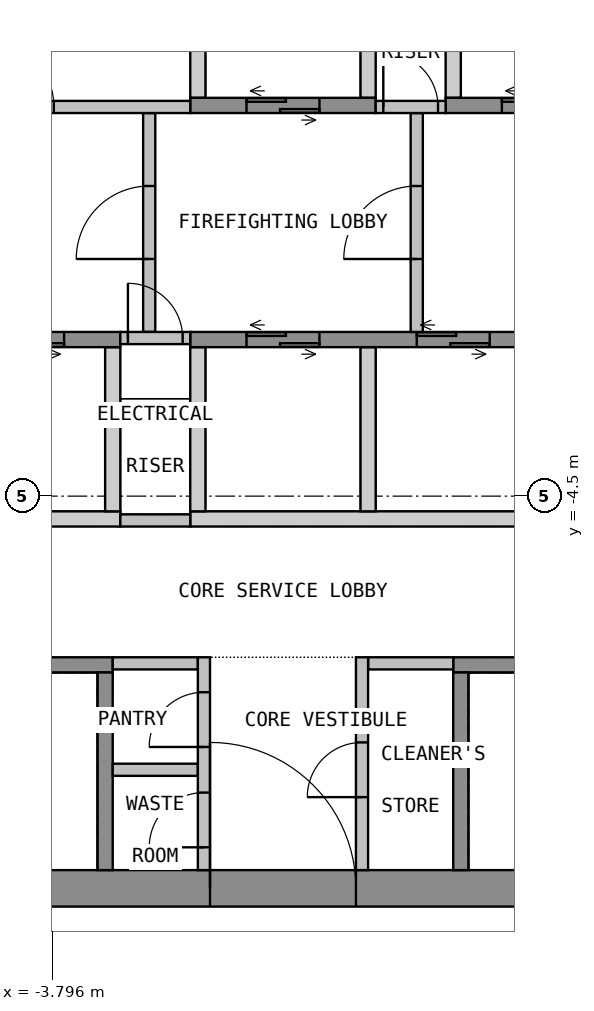
"""IFC4 building model, lengths in metres.
Left out: names, types, materials, properties, quantities, classifications, styles, units other than length and angle.
Written with IfcOpenShell. Run it as: python <this file> out.ifc"""

import sys

from ifc_helpers import new_model, si_unit, direction, frame, frame_2d, origin, place, context, subcontext, project, spatial, polyline, rectangle, outline, extrude, element, fill, save


model = new_model("IFC4")
c1 = context("Model", 3, precision=1e-05, world=origin(), true_north=direction((0.0, 1.0)))
c2 = subcontext(c1, "Body", "Model", "MODEL_VIEW")
j1 = project(units=[si_unit("LENGTHUNIT", "METRE"), si_unit("PLANEANGLEUNIT", "RADIAN")], contexts=[c1])
p1 = place(None, origin())
s1 = spatial("IfcSite", under=j1, at=p1, CompositionType="ELEMENT")
p2 = place(p1, origin())
s2 = spatial("IfcBuilding", under=s1, at=p2, CompositionType="ELEMENT")
p3 = place(p2, frame((0.0, 0.0, 286.5)))
s3 = spatial("IfcBuildingStorey", under=s2, at=p3, CompositionType="ELEMENT", Elevation=286.5)
p4 = place(p3, frame((-13.5, -10.95, 0.0), z_axis=(0.0, 0.0, 1.0), x_axis=(1.0, 0.0, 0.0)))
e1 = element("IfcWall", 1, at=p4, inside=s3, PredefinedType="SHEAR", context=c2, shape_type="SweptSolid", body=[
    extrude(rectangle(XDim=27.0, YDim=0.6, at=frame_2d((13.5, 0.0))), origin(), (0.0, 0.0, 1.0), 3.575),
])
p5 = place(p4, frame((12.3, 0.0, 0.0)))
e2 = element("IfcOpeningElement", 2, at=p5, cuts=e1, PredefinedType="OPENING", context=c2, shape_type="SweptSolid", body=[
    extrude(rectangle(XDim=2.4, YDim=2.1, at=frame_2d((1.2, 1.05))), frame((0.0, 0.31, 0.0), z_axis=(0.0, -1.0, 0.0), x_axis=(1.0, 0.0, 0.0)), (0.0, 0.0, 1.0), 0.62),
])
p6 = place(p4, frame((1.05, 0.0, 0.0)))
e3 = element("IfcOpeningElement", 3, at=p6, cuts=e1, PredefinedType="OPENING", context=c2, shape_type="SweptSolid", body=[
    extrude(rectangle(XDim=1.2, YDim=2.1, at=frame_2d((0.6, 1.05))), frame((0.0, 0.31, 0.0), z_axis=(0.0, -1.0, 0.0), x_axis=(1.0, 0.0, 0.0)), (0.0, 0.0, 1.0), 0.62),
])
p7 = place(p4, frame((24.75, 0.0, 0.0)))
e4 = element("IfcOpeningElement", 4, at=p7, cuts=e1, PredefinedType="OPENING", context=c2, shape_type="SweptSolid", body=[
    extrude(rectangle(XDim=1.2, YDim=2.1, at=frame_2d((0.6, 1.05))), frame((0.0, 0.31, 0.0), z_axis=(0.0, -1.0, 0.0), x_axis=(1.0, 0.0, 0.0)), (0.0, 0.0, 1.0), 0.62),
])
p8 = place(p3, origin())
e5 = element("IfcWall", 5, at=p8, inside=s3, PredefinedType="SHEAR", context=c2, shape_type="SweptSolid", body=[
    extrude(outline(polyline([(-1.525, 2.05), (-1.275, 2.05), (-1.275, 4.75), (-1.525, 4.75), (-1.525, 2.05)])), origin(), (0.0, 0.0, 1.0), 3.575),
])
p9 = place(p3, origin())
e6 = element("IfcWall", 6, at=p9, inside=s3, PredefinedType="SHEAR", context=c2, shape_type="SweptSolid", body=[
    extrude(outline(polyline([(1.275, 2.05), (1.525, 2.05), (1.525, 4.75), (1.275, 4.75), (1.275, 2.05)])), origin(), (0.0, 0.0, 1.0), 3.575),
])
p10 = place(p3, origin())
e7 = element("IfcWall", 7, at=p10, inside=s3, PredefinedType="SHEAR", context=c2, shape_type="SweptSolid", body=[
    extrude(outline(polyline([(2.675, 2.05), (2.925, 2.05), (2.925, 4.75), (2.675, 4.75), (2.675, 2.05)])), origin(), (0.0, 0.0, 1.0), 3.575),
])
p11 = place(p3, frame((-1.525, 1.925, 0.0), z_axis=(0.0, 0.0, 1.0), x_axis=(1.0, 0.0, 0.0)))
e8 = element("IfcWall", 8, at=p11, inside=s3, PredefinedType="SHEAR", context=c2, shape_type="SweptSolid", body=[
    extrude(rectangle(XDim=3.05, YDim=0.25, at=frame_2d((1.525, 0.0))), origin(), (0.0, 0.0, 1.0), 3.575),
])
p12 = place(p11, frame((0.925, 0.0, 0.0)))
e9 = element("IfcOpeningElement", 9, at=p12, cuts=e8, PredefinedType="OPENING", context=c2, shape_type="SweptSolid", body=[
    extrude(rectangle(XDim=1.2, YDim=2.1, at=frame_2d((0.6, 1.05))), frame((0.0, 0.135, 0.0), z_axis=(0.0, -1.0, 0.0), x_axis=(1.0, 0.0, 0.0)), (0.0, 0.0, 1.0), 0.27),
])
p13 = place(p3, frame((2.675, 1.925, 0.0), z_axis=(0.0, 0.0, 1.0), x_axis=(1.0, 0.0, 0.0)))
e10 = element("IfcWall", 10, at=p13, inside=s3, PredefinedType="SHEAR", context=c2, shape_type="SweptSolid", body=[
    extrude(rectangle(XDim=5.85, YDim=0.25, at=frame_2d((2.925, 0.0))), origin(), (0.0, 0.0, 1.0), 3.575),
])
p14 = place(p13, frame((0.925, 0.0, 0.0)))
e11 = element("IfcOpeningElement", 11, at=p14, cuts=e10, PredefinedType="OPENING", context=c2, shape_type="SweptSolid", body=[
    extrude(rectangle(XDim=1.2, YDim=2.1, at=frame_2d((0.6, 1.05))), frame((0.0, 0.135, 0.0), z_axis=(0.0, -1.0, 0.0), x_axis=(1.0, 0.0, 0.0)), (0.0, 0.0, 1.0), 0.27),
])
p15 = place(p13, frame((3.725, 0.0, 0.0)))
e12 = element("IfcOpeningElement", 12, at=p15, cuts=e10, PredefinedType="OPENING", context=c2, shape_type="SweptSolid", body=[
    extrude(rectangle(XDim=1.2, YDim=2.1, at=frame_2d((0.6, 1.05))), frame((0.0, 0.135, 0.0), z_axis=(0.0, -1.0, 0.0), x_axis=(1.0, 0.0, 0.0)), (0.0, 0.0, 1.0), 0.27),
])
p16 = place(p3, origin())
e13 = element("IfcWall", 13, at=p16, inside=s3, PredefinedType="SHEAR", context=c2, shape_type="SweptSolid", body=[
    extrude(outline(polyline([(-11.325, -5.0), (-2.675, -5.0), (-2.675, -4.75), (-11.325, -4.75), (-11.325, -5.0)])), origin(), (0.0, 0.0, 1.0), 3.575),
])
p17 = place(p3, origin())
e14 = element("IfcWall", 14, at=p17, inside=s3, PredefinedType="SHEAR", context=c2, shape_type="SweptSolid", body=[
    extrude(outline(polyline([(-1.525, -5.0), (4.325, -5.0), (4.325, -4.75), (-1.525, -4.75), (-1.525, -5.0)])), origin(), (0.0, 0.0, 1.0), 3.575),
])
p18 = place(p3, origin())
e15 = element("IfcWall", 15, at=p18, inside=s3, PredefinedType="SHEAR", context=c2, shape_type="SweptSolid", body=[
    extrude(outline(polyline([(-2.925, -4.75), (-2.675, -4.75), (-2.675, -2.05), (-2.925, -2.05), (-2.925, -4.75)])), origin(), (0.0, 0.0, 1.0), 3.575),
])
p19 = place(p3, origin())
e16 = element("IfcWall", 16, at=p19, inside=s3, PredefinedType="SHEAR", context=c2, shape_type="SweptSolid", body=[
    extrude(outline(polyline([(-1.525, -4.75), (-1.275, -4.75), (-1.275, -2.05), (-1.525, -2.05), (-1.525, -4.75)])), origin(), (0.0, 0.0, 1.0), 3.575),
])
p20 = place(p3, origin())
e17 = element("IfcWall", 17, at=p20, inside=s3, PredefinedType="SHEAR", context=c2, shape_type="SweptSolid", body=[
    extrude(outline(polyline([(1.275, -4.75), (1.525, -4.75), (1.525, -2.05), (1.275, -2.05), (1.275, -4.75)])), origin(), (0.0, 0.0, 1.0), 3.575),
])
p21 = place(p3, frame((-11.325, -1.925, 0.0), z_axis=(0.0, 0.0, 1.0), x_axis=(1.0, 0.0, 0.0)))
e18 = element("IfcWall", 18, at=p21, inside=s3, PredefinedType="SHEAR", context=c2, shape_type="SweptSolid", body=[
    extrude(rectangle(XDim=8.65, YDim=0.25, at=frame_2d((4.325, 0.0))), origin(), (0.0, 0.0, 1.0), 3.575),
])
p22 = place(p21, frame((0.925, 0.0, 0.0)))
e19 = element("IfcOpeningElement", 19, at=p22, cuts=e18, PredefinedType="OPENING", context=c2, shape_type="SweptSolid", body=[
    extrude(rectangle(XDim=1.2, YDim=2.1, at=frame_2d((0.6, 1.05))), frame((0.0, 0.135, 0.0), z_axis=(0.0, -1.0, 0.0), x_axis=(1.0, 0.0, 0.0)), (0.0, 0.0, 1.0), 0.27),
])
p23 = place(p21, frame((3.725, 0.0, 0.0)))
e20 = element("IfcOpeningElement", 20, at=p23, cuts=e18, PredefinedType="OPENING", context=c2, shape_type="SweptSolid", body=[
    extrude(rectangle(XDim=1.2, YDim=2.1, at=frame_2d((0.6, 1.05))), frame((0.0, 0.135, 0.0), z_axis=(0.0, -1.0, 0.0), x_axis=(1.0, 0.0, 0.0)), (0.0, 0.0, 1.0), 0.27),
])
p24 = place(p21, frame((6.525, 0.0, 0.0)))
e21 = element("IfcOpeningElement", 21, at=p24, cuts=e18, PredefinedType="OPENING", context=c2, shape_type="SweptSolid", body=[
    extrude(rectangle(XDim=1.2, YDim=2.1, at=frame_2d((0.6, 1.05))), frame((0.0, 0.135, 0.0), z_axis=(0.0, -1.0, 0.0), x_axis=(1.0, 0.0, 0.0)), (0.0, 0.0, 1.0), 0.27),
])
p25 = place(p3, frame((-1.525, -1.925, 0.0), z_axis=(0.0, 0.0, 1.0), x_axis=(1.0, 0.0, 0.0)))
e22 = element("IfcWall", 22, at=p25, inside=s3, PredefinedType="SHEAR", context=c2, shape_type="SweptSolid", body=[
    extrude(rectangle(XDim=5.85, YDim=0.25, at=frame_2d((2.925, 0.0))), origin(), (0.0, 0.0, 1.0), 3.575),
])
p26 = place(p25, frame((0.925, 0.0, 0.0)))
e23 = element("IfcOpeningElement", 23, at=p26, cuts=e22, PredefinedType="OPENING", context=c2, shape_type="SweptSolid", body=[
    extrude(rectangle(XDim=1.2, YDim=2.1, at=frame_2d((0.6, 1.05))), frame((0.0, 0.135, 0.0), z_axis=(0.0, -1.0, 0.0), x_axis=(1.0, 0.0, 0.0)), (0.0, 0.0, 1.0), 0.27),
])
p27 = place(p25, frame((3.725, 0.0, 0.0)))
e24 = element("IfcOpeningElement", 24, at=p27, cuts=e22, PredefinedType="OPENING", context=c2, shape_type="SweptSolid", body=[
    extrude(rectangle(XDim=1.2, YDim=2.1, at=frame_2d((0.6, 1.05))), frame((0.0, 0.135, 0.0), z_axis=(0.0, -1.0, 0.0), x_axis=(1.0, 0.0, 0.0)), (0.0, 0.0, 1.0), 0.27),
])
p28 = place(p3, frame((-2.2, -1.8, 0.0), z_axis=(0.0, 0.0, 1.0), x_axis=(0.0, 1.0, 0.0)))
e25 = element("IfcWall", 25, at=p28, inside=s3, PredefinedType="PARTITIONING", context=c2, shape_type="SweptSolid", body=[
    extrude(rectangle(XDim=3.6, YDim=0.2, at=frame_2d((1.8, 0.0))), origin(), (0.0, 0.0, 1.0), 3.575),
])
p29 = place(p28, frame((1.2, 0.0, 0.0)))
e26 = element("IfcOpeningElement", 26, at=p29, cuts=e25, PredefinedType="OPENING", context=c2, shape_type="SweptSolid", body=[
    extrude(rectangle(XDim=1.2, YDim=2.1, at=frame_2d((0.6, 1.05))), frame((0.0, 0.11, 0.0), z_axis=(0.0, -1.0, 0.0), x_axis=(1.0, 0.0, 0.0)), (0.0, 0.0, 1.0), 0.22),
])
p30 = place(p3, frame((2.2, -1.8, 0.0), z_axis=(0.0, 0.0, 1.0), x_axis=(0.0, 1.0, 0.0)))
e27 = element("IfcWall", 27, at=p30, inside=s3, PredefinedType="PARTITIONING", context=c2, shape_type="SweptSolid", body=[
    extrude(rectangle(XDim=3.6, YDim=0.2, at=frame_2d((1.8, 0.0))), origin(), (0.0, 0.0, 1.0), 3.575),
])
p31 = place(p30, frame((1.2, 0.0, 0.0)))
e28 = element("IfcOpeningElement", 28, at=p31, cuts=e27, PredefinedType="OPENING", context=c2, shape_type="SweptSolid", body=[
    extrude(rectangle(XDim=1.2, YDim=2.1, at=frame_2d((0.6, 1.05))), frame((0.0, 0.11, 0.0), z_axis=(0.0, -1.0, 0.0), x_axis=(1.0, 0.0, 0.0)), (0.0, 0.0, 1.0), 0.22),
])
p32 = place(p3, frame((-12.9, -7.275, 0.0), z_axis=(0.0, 0.0, 1.0), x_axis=(1.0, 0.0, 0.0)))
e29 = element("IfcWall", 29, at=p32, inside=s3, PredefinedType="SHEAR", context=c2, shape_type="SweptSolid", body=[
    extrude(rectangle(XDim=10.1, YDim=0.25, at=frame_2d((5.05, 0.0))), origin(), (0.0, 0.0, 1.0), 3.575),
])
p33 = place(p32, frame((0.45, 0.0, 0.0)))
e30 = element("IfcOpeningElement", 30, at=p33, cuts=e29, PredefinedType="OPENING", context=c2, shape_type="SweptSolid", body=[
    extrude(rectangle(XDim=1.2, YDim=2.1, at=frame_2d((0.6, 1.05))), frame((0.0, 0.135, 0.0), z_axis=(0.0, -1.0, 0.0), x_axis=(1.0, 0.0, 0.0)), (0.0, 0.0, 1.0), 0.27),
])
p34 = place(p3, frame((-2.925, -10.65, 0.0), z_axis=(0.0, 0.0, 1.0), x_axis=(0.0, 1.0, 0.0)))
e31 = element("IfcWall", 31, at=p34, inside=s3, PredefinedType="SHEAR", context=c2, shape_type="SweptSolid", body=[
    extrude(rectangle(XDim=3.25, YDim=0.25, at=frame_2d((1.625, 0.0))), origin(), (0.0, 0.0, 1.0), 3.575),
])
p35 = place(p3, frame((2.8, -7.275, 0.0), z_axis=(0.0, 0.0, 1.0), x_axis=(1.0, 0.0, 0.0)))
e32 = element("IfcWall", 32, at=p35, inside=s3, PredefinedType="SHEAR", context=c2, shape_type="SweptSolid", body=[
    extrude(rectangle(XDim=10.1, YDim=0.25, at=frame_2d((5.05, 0.0))), origin(), (0.0, 0.0, 1.0), 3.575),
])
p36 = place(p35, frame((8.45, 0.0, 0.0)))
e33 = element("IfcOpeningElement", 33, at=p36, cuts=e32, PredefinedType="OPENING", context=c2, shape_type="SweptSolid", body=[
    extrude(rectangle(XDim=1.2, YDim=2.1, at=frame_2d((0.6, 1.05))), frame((0.0, 0.135, 0.0), z_axis=(0.0, -1.0, 0.0), x_axis=(1.0, 0.0, 0.0)), (0.0, 0.0, 1.0), 0.27),
])
p37 = place(p3, frame((2.925, -10.65, 0.0), z_axis=(0.0, 0.0, 1.0), x_axis=(0.0, 1.0, 0.0)))
e34 = element("IfcWall", 34, at=p37, inside=s3, PredefinedType="SHEAR", context=c2, shape_type="SweptSolid", body=[
    extrude(rectangle(XDim=3.25, YDim=0.25, at=frame_2d((1.625, 0.0))), origin(), (0.0, 0.0, 1.0), 3.575),
])
for number, where, z_axis, x_axis in (
    (35, (-2.8, -7.25, 0.0), (0.0, 0.0, 1.0), (1.0, 0.0, 0.0)),
    (36, (-2.8, -9.0, 0.0), (0.0, 0.0, 1.0), (1.0, 0.0, 0.0)),
    (37, (1.4, -7.25, 0.0), (0.0, 0.0, 1.0), (1.0, 0.0, 0.0)),
):
    element("IfcWall", number, at=place(p3, frame(where, z_axis=z_axis, x_axis=x_axis)), inside=s3, PredefinedType="PARTITIONING", context=c2, shape_type="SweptSolid", body=[
        extrude(rectangle(XDim=1.4, YDim=0.2, at=frame_2d((0.7, 0.0))), origin(), (0.0, 0.0, 1.0), 3.575),
    ])
p38 = place(p3, frame((-1.3, -10.65, 0.0), z_axis=(0.0, 0.0, 1.0), x_axis=(0.0, 1.0, 0.0)))
e38 = element("IfcWall", 38, at=p38, inside=s3, PredefinedType="PARTITIONING", context=c2, shape_type="SweptSolid", body=[
    extrude(rectangle(XDim=3.5, YDim=0.2, at=frame_2d((1.75, 0.0))), origin(), (0.0, 0.0, 1.0), 3.575),
])
p39 = place(p38, frame((0.375, 0.0, 0.0)))
e39 = element("IfcOpeningElement", 39, at=p39, cuts=e38, PredefinedType="OPENING", context=c2, shape_type="SweptSolid", body=[
    extrude(rectangle(XDim=0.9, YDim=2.1, at=frame_2d((0.45, 1.05))), frame((0.0, 0.11, 0.0), z_axis=(0.0, -1.0, 0.0), x_axis=(1.0, 0.0, 0.0)), (0.0, 0.0, 1.0), 0.22),
])
p40 = place(p38, frame((2.025, 0.0, 0.0)))
e40 = element("IfcOpeningElement", 40, at=p40, cuts=e38, PredefinedType="OPENING", context=c2, shape_type="SweptSolid", body=[
    extrude(rectangle(XDim=0.9, YDim=2.1, at=frame_2d((0.45, 1.05))), frame((0.0, 0.11, 0.0), z_axis=(0.0, -1.0, 0.0), x_axis=(1.0, 0.0, 0.0)), (0.0, 0.0, 1.0), 0.22),
])
p41 = place(p3, frame((1.3, -10.65, 0.0), z_axis=(0.0, 0.0, 1.0), x_axis=(0.0, 1.0, 0.0)))
e41 = element("IfcWall", 41, at=p41, inside=s3, PredefinedType="PARTITIONING", context=c2, shape_type="SweptSolid", body=[
    extrude(rectangle(XDim=3.5, YDim=0.2, at=frame_2d((1.75, 0.0))), origin(), (0.0, 0.0, 1.0), 3.575),
])
p42 = place(p41, frame((1.2, 0.0, 0.0)))
e42 = element("IfcOpeningElement", 42, at=p42, cuts=e41, PredefinedType="OPENING", context=c2, shape_type="SweptSolid", body=[
    extrude(rectangle(XDim=0.9, YDim=2.1, at=frame_2d((0.45, 1.05))), frame((0.0, 0.11, 0.0), z_axis=(0.0, -1.0, 0.0), x_axis=(1.0, 0.0, 0.0)), (0.0, 0.0, 1.0), 0.22),
])
p43 = place(p3, frame((-12.9, 1.9, 0.0), z_axis=(0.0, 0.0, 1.0), x_axis=(1.0, 0.0, 0.0)))
e43 = element("IfcWall", 43, at=p43, inside=s3, PredefinedType="PARTITIONING", context=c2, shape_type="SweptSolid", body=[
    extrude(rectangle(XDim=11.375, YDim=0.2, at=frame_2d((5.688, 0.0))), origin(), (0.0, 0.0, 1.0), 3.575),
])
p44 = place(p43, frame((2.244, 0.0, 0.0)))
e44 = element("IfcOpeningElement", 44, at=p44, cuts=e43, PredefinedType="OPENING", context=c2, shape_type="SweptSolid", body=[
    extrude(rectangle(XDim=1.2, YDim=2.1, at=frame_2d((0.6, 1.05))), frame((0.0, 0.11, 0.0), z_axis=(0.0, -1.0, 0.0), x_axis=(1.0, 0.0, 0.0)), (0.0, 0.0, 1.0), 0.22),
])
p45 = place(p43, frame((7.931, 0.0, 0.0)))
e45 = element("IfcOpeningElement", 45, at=p45, cuts=e43, PredefinedType="OPENING", context=c2, shape_type="SweptSolid", body=[
    extrude(rectangle(XDim=1.2, YDim=2.1, at=frame_2d((0.6, 1.05))), frame((0.0, 0.11, 0.0), z_axis=(0.0, -1.0, 0.0), x_axis=(1.0, 0.0, 0.0)), (0.0, 0.0, 1.0), 0.22),
])
p46 = place(p3, frame((1.525, 1.9, 0.0), z_axis=(0.0, 0.0, 1.0), x_axis=(1.0, 0.0, 0.0)))
e46 = element("IfcWall", 46, at=p46, inside=s3, PredefinedType="PARTITIONING", context=c2, shape_type="SweptSolid", body=[
    extrude(rectangle(XDim=1.15, YDim=0.2, at=frame_2d((0.575, 0.0))), origin(), (0.0, 0.0, 1.0), 3.575),
])
p47 = place(p46, frame((0.125, 0.0, 0.0)))
e47 = element("IfcOpeningElement", 47, at=p47, cuts=e46, PredefinedType="OPENING", context=c2, shape_type="SweptSolid", body=[
    extrude(rectangle(XDim=0.9, YDim=2.1, at=frame_2d((0.45, 1.05))), frame((0.0, 0.11, 0.0), z_axis=(0.0, -1.0, 0.0), x_axis=(1.0, 0.0, 0.0)), (0.0, 0.0, 1.0), 0.22),
])
p48 = place(p3, frame((-2.675, -1.9, 0.0), z_axis=(0.0, 0.0, 1.0), x_axis=(1.0, 0.0, 0.0)))
e48 = element("IfcWall", 48, at=p48, inside=s3, PredefinedType="PARTITIONING", context=c2, shape_type="SweptSolid", body=[
    extrude(rectangle(XDim=1.15, YDim=0.2, at=frame_2d((0.575, 0.0))), origin(), (0.0, 0.0, 1.0), 3.575),
])
p49 = place(p48, frame((0.125, 0.0, 0.0)))
e49 = element("IfcOpeningElement", 49, at=p49, cuts=e48, PredefinedType="OPENING", context=c2, shape_type="SweptSolid", body=[
    extrude(rectangle(XDim=0.9, YDim=2.1, at=frame_2d((0.45, 1.05))), frame((0.0, 0.11, 0.0), z_axis=(0.0, -1.0, 0.0), x_axis=(1.0, 0.0, 0.0)), (0.0, 0.0, 1.0), 0.22),
])
p50 = place(p3, frame((-2.675, -4.9, 0.0), z_axis=(0.0, 0.0, 1.0), x_axis=(1.0, 0.0, 0.0)))
e50 = element("IfcWall", 50, at=p50, inside=s3, PredefinedType="PARTITIONING", context=c2, shape_type="SweptSolid", body=[
    extrude(rectangle(XDim=1.15, YDim=0.2, at=frame_2d((0.575, 0.0))), origin(), (0.0, 0.0, 1.0), 3.575),
])
p51 = place(p5, origin())
e51 = element("IfcDoor", 51, at=p51, inside=s3, OperationType="DOUBLE_DOOR_DOUBLE_SWING", PredefinedType="DOOR", context=c2, shape_type="SweptSolid", body=[
    extrude(rectangle(XDim=2.4, YDim=2.1, at=frame_2d((1.2, 1.05))), frame((0.0, 0.025, 0.0), z_axis=(0.0, -1.0, 0.0), x_axis=(1.0, 0.0, 0.0)), (0.0, 0.0, 1.0), 0.05),
])
fill(e2, e51)
p52 = place(p12, origin())
e52 = element("IfcDoor", 52, at=p52, inside=s3, OperationType="DOUBLE_DOOR_SLIDING", PredefinedType="DOOR", context=c2, shape_type="SweptSolid", body=[
    extrude(rectangle(XDim=1.2, YDim=2.1, at=frame_2d((0.6, 1.05))), frame((0.0, 0.025, 0.0), z_axis=(0.0, -1.0, 0.0), x_axis=(1.0, 0.0, 0.0)), (0.0, 0.0, 1.0), 0.05),
])
fill(e9, e52)
p53 = place(p14, origin())
e53 = element("IfcDoor", 53, at=p53, inside=s3, OperationType="DOUBLE_DOOR_SLIDING", PredefinedType="DOOR", context=c2, shape_type="SweptSolid", body=[
    extrude(rectangle(XDim=1.2, YDim=2.1, at=frame_2d((0.6, 1.05))), frame((0.0, 0.025, 0.0), z_axis=(0.0, -1.0, 0.0), x_axis=(1.0, 0.0, 0.0)), (0.0, 0.0, 1.0), 0.05),
])
fill(e11, e53)
p54 = place(p24, origin())
e54 = element("IfcDoor", 54, at=p54, inside=s3, OperationType="DOUBLE_DOOR_SLIDING", PredefinedType="DOOR", context=c2, shape_type="SweptSolid", body=[
    extrude(rectangle(XDim=1.2, YDim=2.1, at=frame_2d((0.6, 1.05))), frame((0.0, 0.025, 0.0), z_axis=(0.0, -1.0, 0.0), x_axis=(1.0, 0.0, 0.0)), (0.0, 0.0, 1.0), 0.05),
])
fill(e21, e54)
p55 = place(p26, origin())
e55 = element("IfcDoor", 55, at=p55, inside=s3, OperationType="DOUBLE_DOOR_SLIDING", PredefinedType="DOOR", context=c2, shape_type="SweptSolid", body=[
    extrude(rectangle(XDim=1.2, YDim=2.1, at=frame_2d((0.6, 1.05))), frame((0.0, 0.025, 0.0), z_axis=(0.0, -1.0, 0.0), x_axis=(1.0, 0.0, 0.0)), (0.0, 0.0, 1.0), 0.05),
])
fill(e23, e55)
p56 = place(p27, origin())
e56 = element("IfcDoor", 56, at=p56, inside=s3, OperationType="DOUBLE_DOOR_SLIDING", PredefinedType="DOOR", context=c2, shape_type="SweptSolid", body=[
    extrude(rectangle(XDim=1.2, YDim=2.1, at=frame_2d((0.6, 1.05))), frame((0.0, 0.025, 0.0), z_axis=(0.0, -1.0, 0.0), x_axis=(1.0, 0.0, 0.0)), (0.0, 0.0, 1.0), 0.05),
])
fill(e24, e56)
p57 = place(p29, origin())
e57 = element("IfcDoor", 57, at=p57, inside=s3, OperationType="SINGLE_SWING_LEFT", PredefinedType="DOOR", context=c2, shape_type="SweptSolid", body=[
    extrude(rectangle(XDim=1.2, YDim=2.1, at=frame_2d((0.6, 1.05))), frame((0.0, 0.025, 0.0), z_axis=(0.0, -1.0, 0.0), x_axis=(1.0, 0.0, 0.0)), (0.0, 0.0, 1.0), 0.05),
])
fill(e26, e57)
p58 = place(p31, origin())
e58 = element("IfcDoor", 58, at=p58, inside=s3, OperationType="SINGLE_SWING_LEFT", PredefinedType="DOOR", context=c2, shape_type="SweptSolid", body=[
    extrude(rectangle(XDim=1.2, YDim=2.1, at=frame_2d((0.6, 1.05))), frame((0.0, 0.025, 0.0), z_axis=(0.0, -1.0, 0.0), x_axis=(1.0, 0.0, 0.0)), (0.0, 0.0, 1.0), 0.05),
])
fill(e28, e58)
p59 = place(p39, origin())
e59 = element("IfcDoor", 59, at=p59, inside=s3, OperationType="SINGLE_SWING_LEFT", PredefinedType="DOOR", context=c2, shape_type="SweptSolid", body=[
    extrude(rectangle(XDim=0.9, YDim=2.1, at=frame_2d((0.45, 1.05))), frame((0.0, 0.025, 0.0), z_axis=(0.0, -1.0, 0.0), x_axis=(1.0, 0.0, 0.0)), (0.0, 0.0, 1.0), 0.05),
])
fill(e39, e59)
p60 = place(p40, origin())
e60 = element("IfcDoor", 60, at=p60, inside=s3, OperationType="SINGLE_SWING_LEFT", PredefinedType="DOOR", context=c2, shape_type="SweptSolid", body=[
    extrude(rectangle(XDim=0.9, YDim=2.1, at=frame_2d((0.45, 1.05))), frame((0.0, 0.025, 0.0), z_axis=(0.0, -1.0, 0.0), x_axis=(1.0, 0.0, 0.0)), (0.0, 0.0, 1.0), 0.05),
])
fill(e40, e60)
p61 = place(p42, origin())
e61 = element("IfcDoor", 61, at=p61, inside=s3, OperationType="SINGLE_SWING_LEFT", PredefinedType="DOOR", context=c2, shape_type="SweptSolid", body=[
    extrude(rectangle(XDim=0.9, YDim=2.1, at=frame_2d((0.45, 1.05))), frame((0.0, 0.025, 0.0), z_axis=(0.0, -1.0, 0.0), x_axis=(1.0, 0.0, 0.0)), (0.0, 0.0, 1.0), 0.05),
])
fill(e42, e61)
p62 = place(p45, origin())
e62 = element("IfcDoor", 62, at=p62, inside=s3, OperationType="SINGLE_SWING_RIGHT", PredefinedType="DOOR", context=c2, shape_type="SweptSolid", body=[
    extrude(rectangle(XDim=1.2, YDim=2.1, at=frame_2d((0.6, 1.05))), frame((0.0, 0.025, 0.0), z_axis=(0.0, -1.0, 0.0), x_axis=(1.0, 0.0, 0.0)), (0.0, 0.0, 1.0), 0.05),
])
fill(e45, e62)
p63 = place(p47, origin())
e63 = element("IfcDoor", 63, at=p63, inside=s3, OperationType="SINGLE_SWING_LEFT", PredefinedType="DOOR", context=c2, shape_type="SweptSolid", body=[
    extrude(rectangle(XDim=0.9, YDim=2.1, at=frame_2d((0.45, 1.05))), frame((0.0, 0.025, 0.0), z_axis=(0.0, -1.0, 0.0), x_axis=(1.0, 0.0, 0.0)), (0.0, 0.0, 1.0), 0.05),
])
fill(e47, e63)
p64 = place(p49, origin())
e64 = element("IfcDoor", 64, at=p64, inside=s3, OperationType="SINGLE_SWING_LEFT", PredefinedType="DOOR", context=c2, shape_type="SweptSolid", body=[
    extrude(rectangle(XDim=0.9, YDim=2.1, at=frame_2d((0.45, 1.05))), frame((0.0, 0.025, 0.0), z_axis=(0.0, -1.0, 0.0), x_axis=(1.0, 0.0, 0.0)), (0.0, 0.0, 1.0), 0.05),
])
fill(e49, e64)
save(model, sys.argv[1])
